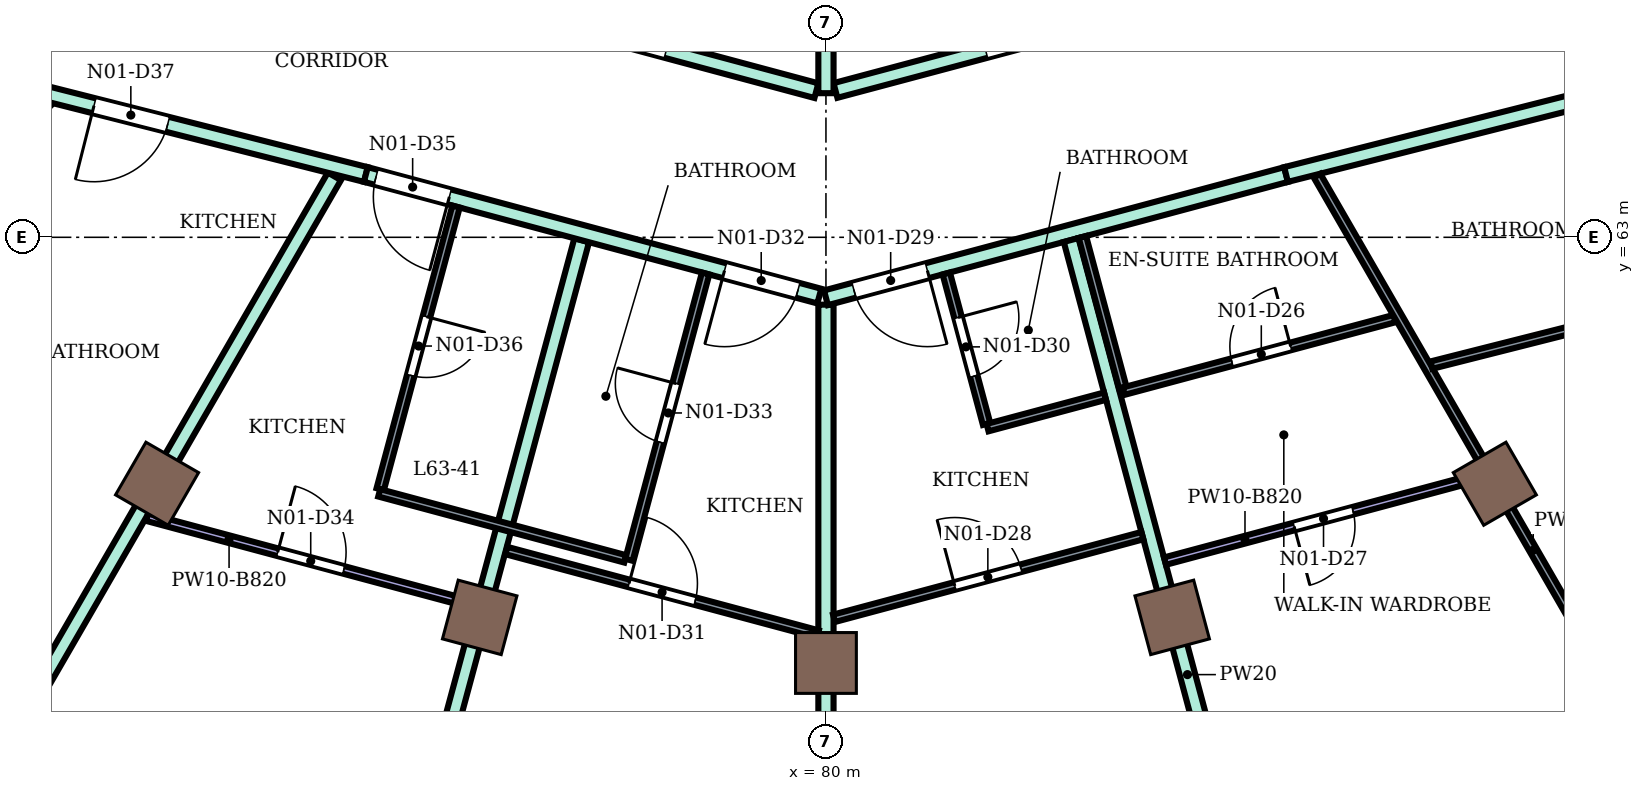
"""IFC4 building model, lengths in metres.
Left out: names, types, materials, properties, quantities, classifications, styles, units other than length and angle.
Written with IfcOpenShell. Run it as: python <this file> out.ifc"""

import sys

from ifc_helpers import new_model, si_unit, direction, frame, frame_2d, origin, origin_2d, place, context, subcontext, project, spatial, rectangle, extrude, element, fill, save


model = new_model("IFC4")
c1 = context("Model", 3, precision=1e-05, world=origin(), true_north=direction((0.0, 1.0)))
c2 = subcontext(c1, "Body", "Model", "MODEL_VIEW")
j1 = project(units=[si_unit("LENGTHUNIT", "METRE"), si_unit("PLANEANGLEUNIT", "RADIAN")], contexts=[c1])
p1 = place(None, origin())
s1 = spatial("IfcSite", under=j1, at=p1, CompositionType="ELEMENT")
p2 = place(p1, origin())
s2 = spatial("IfcBuilding", under=s1, at=p2, CompositionType="ELEMENT")
p3 = place(p2, frame((0.0, 0.0, 275.7)))
s3 = spatial("IfcBuildingStorey", under=s2, at=p3, CompositionType="ELEMENT", Elevation=275.7)
for number, where, z_axis, x_axis in (
    (1, (71.2, 59.758, 0.0), (0.0, 0.0, 1.0), (-0.5, -0.866, 0.0)),
    (2, (75.445, 58.0, 0.0), (0.0, 0.0, 1.0), (-0.259, -0.966, 0.0)),
    (3, (80.0, 57.4, 0.0), (0.0, 0.0, 1.0), (0.0, -1.0, 0.0)),
    (4, (84.555, 58.0, 0.0), (0.0, 0.0, 1.0), (0.259, -0.966, 0.0)),
    (5, (88.8, 59.758, 0.0), (0.0, 0.0, 1.0), (0.5, -0.866, 0.0)),
):
    element("IfcColumn", number, at=place(p3, frame(where, z_axis=z_axis, x_axis=x_axis)), inside=s3, PredefinedType="COLUMN", context=c2, shape_type="SweptSolid", body=[
        extrude(rectangle(XDim=0.8, YDim=0.8, at=origin_2d()), origin(), (0.0, 0.0, 1.0), 4.2),
    ])
p4 = place(p3, frame((67.848, 53.959, 0.0), z_axis=(0.0, 0.0, 1.0), x_axis=(0.500121565392, 0.865955206595, 0.0)))
e6 = element("IfcWall", 6, at=p4, inside=s3, PredefinedType="PARTITIONING", context=c2, shape_type="SweptSolid", body=[
    extrude(rectangle(XDim=11.366, YDim=0.2, at=frame_2d((5.683, 0.0))), origin(), (0.0, 0.0, 1.0), 3.75),
])
p5 = place(p3, frame((68.2, 65.28, 0.0), z_axis=(0.0, 0.0, 1.0), x_axis=(0.969440802773, -0.24532535523, 0.0)))
e7 = element("IfcWall", 7, at=p5, inside=s3, PredefinedType="PARTITIONING", context=c2, shape_type="SweptSolid", body=[
    extrude(rectangle(XDim=5.928, YDim=0.2, at=frame_2d((2.964, 0.0))), origin(), (0.0, 0.0, 1.0), 3.75),
])
p6 = place(p5, frame((2.239, 0.0, 0.0)))
e8 = element("IfcOpeningElement", 8, at=p6, cuts=e7, PredefinedType="OPENING", context=c2, shape_type="SweptSolid", body=[
    extrude(rectangle(XDim=1.0, YDim=2.1, at=frame_2d((0.5, 1.05))), frame((0.0, 0.11, 0.0), z_axis=(0.0, -1.0, 0.0), x_axis=(1.0, 0.0, 0.0)), (0.0, 0.0, 1.0), 0.22),
])
p7 = place(p3, frame((73.702, 51.532, 0.0), z_axis=(0.0, 0.0, 1.0), x_axis=(0.2605791587, 0.965452485652, 0.0)))
e9 = element("IfcWall", 9, at=p7, inside=s3, PredefinedType="PARTITIONING", context=c2, shape_type="SweptSolid", body=[
    extrude(rectangle(XDim=11.838, YDim=0.2, at=frame_2d((5.919, 0.0))), origin(), (0.0, 0.0, 1.0), 3.75),
])
p8 = place(p3, frame((73.947, 63.826, 0.0), z_axis=(0.0, 0.0, 1.0), x_axis=(0.965872508768, -0.25901794688, 0.0)))
e10 = element("IfcWall", 10, at=p8, inside=s3, PredefinedType="PARTITIONING", context=c2, shape_type="SweptSolid", body=[
    extrude(rectangle(XDim=6.177, YDim=0.2, at=frame_2d((3.088, 0.0))), origin(), (0.0, 0.0, 1.0), 3.75),
])
p9 = place(p8, frame((4.885, 0.0, 0.0)))
e11 = element("IfcOpeningElement", 11, at=p9, cuts=e10, PredefinedType="OPENING", context=c2, shape_type="SweptSolid", body=[
    extrude(rectangle(XDim=1.0, YDim=2.1, at=frame_2d((0.5, 1.05))), frame((0.0, 0.11, 0.0), z_axis=(0.0, -1.0, 0.0), x_axis=(1.0, 0.0, 0.0)), (0.0, 0.0, 1.0), 0.22),
])
p10 = place(p8, frame((0.137, 0.0, 0.0)))
e12 = element("IfcOpeningElement", 12, at=p10, cuts=e10, PredefinedType="OPENING", context=c2, shape_type="SweptSolid", body=[
    extrude(rectangle(XDim=1.0, YDim=2.1, at=frame_2d((0.5, 1.05))), frame((0.0, 0.11, 0.0), z_axis=(0.0, -1.0, 0.0), x_axis=(1.0, 0.0, 0.0)), (0.0, 0.0, 1.0), 0.22),
])
p11 = place(p3, frame((74.603, 66.342, 0.0), z_axis=(0.0, 0.0, 1.0), x_axis=(0.965920893652, -0.258837453254, 0.0)))
e13 = element("IfcWall", 13, at=p11, inside=s3, PredefinedType="PARTITIONING", context=c2, shape_type="SweptSolid", body=[
    extrude(rectangle(XDim=5.458, YDim=0.2, at=frame_2d((2.729, 0.0))), origin(), (0.0, 0.0, 1.0), 3.75),
])
p12 = place(p11, frame((2.512, 0.0, 0.0)))
e14 = element("IfcOpeningElement", 14, at=p12, cuts=e13, PredefinedType="OPENING", context=c2, shape_type="SweptSolid", body=[
    extrude(rectangle(XDim=0.9, YDim=2.1, at=frame_2d((0.45, 1.05))), frame((0.0, 0.11, 0.0), z_axis=(0.0, -1.0, 0.0), x_axis=(1.0, 0.0, 0.0)), (0.0, 0.0, 1.0), 0.22),
])
p13 = place(p3, frame((80.125, 64.932, 0.0), z_axis=(0.0, 0.0, 1.0), x_axis=(0.966236955806, 0.257655089674, 0.0)))
e15 = element("IfcWall", 15, at=p13, inside=s3, PredefinedType="PARTITIONING", context=c2, shape_type="SweptSolid", body=[
    extrude(rectangle(XDim=8.039, YDim=0.2, at=frame_2d((4.02, 0.0))), origin(), (0.0, 0.0, 1.0), 3.75),
])
p14 = place(p13, frame((6.298, 0.0, 0.0)))
e16 = element("IfcOpeningElement", 16, at=p14, cuts=e15, PredefinedType="OPENING", context=c2, shape_type="SweptSolid", body=[
    extrude(rectangle(XDim=0.9, YDim=2.1, at=frame_2d((0.45, 1.05))), frame((0.0, 0.11, 0.0), z_axis=(0.0, -1.0, 0.0), x_axis=(1.0, 0.0, 0.0)), (0.0, 0.0, 1.0), 0.22),
])
p15 = place(p13, frame((2.045, 0.0, 0.0)))
e17 = element("IfcOpeningElement", 17, at=p15, cuts=e15, PredefinedType="OPENING", context=c2, shape_type="SweptSolid", body=[
    extrude(rectangle(XDim=0.9, YDim=2.1, at=frame_2d((0.45, 1.05))), frame((0.0, 0.11, 0.0), z_axis=(0.0, -1.0, 0.0), x_axis=(1.0, 0.0, 0.0)), (0.0, 0.0, 1.0), 0.22),
])
p16 = place(p3, frame((80.0, 53.3, 0.0), z_axis=(0.0, 0.0, 1.0), x_axis=(0.0, 1.0, 0.0)))
e18 = element("IfcWall", 18, at=p16, inside=s3, PredefinedType="PARTITIONING", context=c2, shape_type="SweptSolid", body=[
    extrude(rectangle(XDim=8.814, YDim=0.2, at=frame_2d((4.407, 0.0))), origin(), (0.0, 0.0, 1.0), 3.75),
])
p17 = place(p3, frame((80.0, 62.204, 0.0), z_axis=(0.0, 0.0, 1.0), x_axis=(0.965960221635, 0.258690645788, 0.0)))
e19 = element("IfcWall", 19, at=p17, inside=s3, PredefinedType="PARTITIONING", context=c2, shape_type="SweptSolid", body=[
    extrude(rectangle(XDim=6.267, YDim=0.2, at=frame_2d((3.133, 0.0))), origin(), (0.0, 0.0, 1.0), 3.75),
])
p18 = place(p17, frame((0.382, 0.0, 0.0)))
e20 = element("IfcOpeningElement", 20, at=p18, cuts=e19, PredefinedType="OPENING", context=c2, shape_type="SweptSolid", body=[
    extrude(rectangle(XDim=1.0, YDim=2.1, at=frame_2d((0.5, 1.05))), frame((0.0, 0.11, 0.0), z_axis=(0.0, -1.0, 0.0), x_axis=(1.0, 0.0, 0.0)), (0.0, 0.0, 1.0), 0.22),
])
p19 = place(p3, frame((80.0, 64.896, 0.0), z_axis=(0.0, 0.0, 1.0), x_axis=(0.0, 1.0, 0.0)))
e21 = element("IfcWall", 21, at=p19, inside=s3, PredefinedType="PARTITIONING", context=c2, shape_type="SweptSolid", body=[
    extrude(rectangle(XDim=2.405, YDim=0.2, at=frame_2d((1.203, 0.0))), origin(), (0.0, 0.0, 1.0), 3.75),
])
p20 = place(p3, frame((83.225, 62.965, 0.0), z_axis=(0.0, 0.0, 1.0), x_axis=(0.258656021451, -0.965969493601, 0.0)))
e22 = element("IfcWall", 22, at=p20, inside=s3, PredefinedType="PARTITIONING", context=c2, shape_type="SweptSolid", body=[
    extrude(rectangle(XDim=11.838, YDim=0.2, at=frame_2d((5.919, 0.0))), origin(), (0.0, 0.0, 1.0), 3.75),
])
p21 = place(p3, frame((86.053, 63.826, 0.0), z_axis=(0.0, 0.0, 1.0), x_axis=(0.969490004987, 0.245130843083, 0.0)))
e23 = element("IfcWall", 23, at=p21, inside=s3, PredefinedType="PARTITIONING", context=c2, shape_type="SweptSolid", body=[
    extrude(rectangle(XDim=5.908, YDim=0.2, at=frame_2d((2.954, 0.0))), origin(), (0.0, 0.0, 1.0), 3.75),
])
p22 = place(p3, frame((71.068, 59.317, 0.0), z_axis=(0.0, 0.0, 1.0), x_axis=(0.965923173799, -0.258828944127, 0.0)))
e24 = element("IfcWall", 24, at=p22, inside=s3, PredefinedType="PARTITIONING", context=c2, shape_type="SweptSolid", body=[
    extrude(rectangle(XDim=4.468, YDim=0.1, at=frame_2d((2.234, 0.0))), origin(), (0.0, 0.0, 1.0), 3.38),
])
p23 = place(p22, frame((1.779, 0.0, 0.0)))
e25 = element("IfcOpeningElement", 25, at=p23, cuts=e24, PredefinedType="OPENING", context=c2, shape_type="SweptSolid", body=[
    extrude(rectangle(XDim=0.9, YDim=2.1, at=frame_2d((0.45, 1.05))), frame((0.0, 0.06, 0.0), z_axis=(0.0, -1.0, 0.0), x_axis=(1.0, 0.0, 0.0)), (0.0, 0.0, 1.0), 0.12),
])
p24 = place(p3, frame((74.136, 59.686, 0.0), z_axis=(0.0, 0.0, 1.0), x_axis=(0.259020336752, 0.965871867873, 0.0)))
e26 = element("IfcWall", 26, at=p24, inside=s3, PredefinedType="PARTITIONING", context=c2, shape_type="SweptSolid", body=[
    extrude(rectangle(XDim=3.849, YDim=0.1, at=frame_2d((1.925, 0.0))), origin(), (0.0, 0.0, 1.0), 3.75),
])
p25 = place(p24, frame((1.55, 0.0, 0.0)))
e27 = element("IfcOpeningElement", 27, at=p25, cuts=e26, PredefinedType="OPENING", context=c2, shape_type="SweptSolid", body=[
    extrude(rectangle(XDim=0.8, YDim=2.1, at=frame_2d((0.4, 1.05))), frame((0.0, 0.06, 0.0), z_axis=(0.0, -1.0, 0.0), x_axis=(1.0, 0.0, 0.0)), (0.0, 0.0, 1.0), 0.12),
])
p26 = place(p3, frame((74.123, 59.638, 0.0), z_axis=(0.0, 0.0, 1.0), x_axis=(0.965820152698, -0.259213102761, 0.0)))
e28 = element("IfcWall", 28, at=p26, inside=s3, PredefinedType="PARTITIONING", context=c2, shape_type="SweptSolid", body=[
    extrude(rectangle(XDim=3.351, YDim=0.1, at=frame_2d((1.676, 0.0))), origin(), (0.0, 0.0, 1.0), 3.75),
])
p27 = place(p3, frame((75.795, 58.879, 0.0), z_axis=(0.0, 0.0, 1.0), x_axis=(0.965895141847, -0.258933533857, 0.0)))
e29 = element("IfcWall", 29, at=p27, inside=s3, PredefinedType="PARTITIONING", context=c2, shape_type="SweptSolid", body=[
    extrude(rectangle(XDim=4.244, YDim=0.1, at=frame_2d((2.122, 0.0))), origin(), (0.0, 0.0, 1.0), 3.75),
])
p28 = place(p27, frame((1.672, 0.0, 0.0)))
e30 = element("IfcOpeningElement", 30, at=p28, cuts=e29, PredefinedType="OPENING", context=c2, shape_type="SweptSolid", body=[
    extrude(rectangle(XDim=0.9, YDim=2.1, at=frame_2d((0.45, 1.05))), frame((0.0, 0.06, 0.0), z_axis=(0.0, -1.0, 0.0), x_axis=(1.0, 0.0, 0.0)), (0.0, 0.0, 1.0), 0.12),
])
p29 = place(p3, frame((77.408, 58.757, 0.0), z_axis=(0.0, 0.0, 1.0), x_axis=(0.258718354301, 0.965952800683, 0.0)))
e31 = element("IfcWall", 31, at=p29, inside=s3, PredefinedType="PARTITIONING", context=c2, shape_type="SweptSolid", body=[
    extrude(rectangle(XDim=3.9, YDim=0.1, at=frame_2d((1.95, 0.0))), origin(), (0.0, 0.0, 1.0), 3.75),
])
p30 = place(p29, frame((1.6, 0.0, 0.0)))
e32 = element("IfcOpeningElement", 32, at=p30, cuts=e31, PredefinedType="OPENING", context=c2, shape_type="SweptSolid", body=[
    extrude(rectangle(XDim=0.8, YDim=2.1, at=frame_2d((0.4, 1.05))), frame((0.0, 0.06, 0.0), z_axis=(0.0, -1.0, 0.0), x_axis=(1.0, 0.0, 0.0)), (0.0, 0.0, 1.0), 0.12),
])
p31 = place(p3, frame((80.106, 57.988, 0.0), z_axis=(0.0, 0.0, 1.0), x_axis=(0.965893555682, 0.25893945063, 0.0)))
e33 = element("IfcWall", 33, at=p31, inside=s3, PredefinedType="PARTITIONING", context=c2, shape_type="SweptSolid", body=[
    extrude(rectangle(XDim=4.2, YDim=0.1, at=frame_2d((2.1, 0.0))), origin(), (0.0, 0.0, 1.0), 3.75),
])
p32 = place(p31, frame((1.645, 0.0, 0.0)))
e34 = element("IfcOpeningElement", 34, at=p32, cuts=e33, PredefinedType="OPENING", context=c2, shape_type="SweptSolid", body=[
    extrude(rectangle(XDim=0.9, YDim=2.1, at=frame_2d((0.45, 1.05))), frame((0.0, 0.06, 0.0), z_axis=(0.0, -1.0, 0.0), x_axis=(1.0, 0.0, 0.0)), (0.0, 0.0, 1.0), 0.12),
])
p33 = place(p3, frame((81.583, 62.524, 0.0), z_axis=(0.0, 0.0, 1.0), x_axis=(0.258559472989, -0.965995341049, 0.0)))
e35 = element("IfcWall", 35, at=p33, inside=s3, PredefinedType="PARTITIONING", context=c2, shape_type="SweptSolid", body=[
    extrude(rectangle(XDim=2.05, YDim=0.1, at=frame_2d((1.025, 0.0))), origin(), (0.0, 0.0, 1.0), 3.75),
])
p34 = place(p33, frame((0.6, 0.0, 0.0)))
e36 = element("IfcOpeningElement", 36, at=p34, cuts=e35, PredefinedType="OPENING", context=c2, shape_type="SweptSolid", body=[
    extrude(rectangle(XDim=0.8, YDim=2.1, at=frame_2d((0.4, 1.05))), frame((0.0, 0.06, 0.0), z_axis=(0.0, -1.0, 0.0), x_axis=(1.0, 0.0, 0.0)), (0.0, 0.0, 1.0), 0.12),
])
p35 = place(p3, frame((82.126, 60.496, 0.0), z_axis=(0.0, 0.0, 1.0), x_axis=(0.965930342518, 0.258802189717, 0.0)))
e37 = element("IfcWall", 37, at=p35, inside=s3, PredefinedType="PARTITIONING", context=c2, shape_type="SweptSolid", body=[
    extrude(rectangle(XDim=1.6, YDim=0.1, at=frame_2d((0.8, 0.0))), origin(), (0.0, 0.0, 1.0), 3.75),
])
p36 = place(p3, frame((83.374, 63.004, 0.0), z_axis=(0.0, 0.0, 1.0), x_axis=(0.259144823933, -0.965838475227, 0.0)))
e38 = element("IfcWall", 38, at=p36, inside=s3, PredefinedType="PARTITIONING", context=c2, shape_type="SweptSolid", body=[
    extrude(rectangle(XDim=2.05, YDim=0.1, at=frame_2d((1.025, 0.0))), origin(), (0.0, 0.0, 1.0), 3.75),
])
p37 = place(p3, frame((83.918, 60.976, 0.0), z_axis=(0.0, 0.0, 1.0), x_axis=(0.965914351064, 0.258861867428, 0.0)))
e39 = element("IfcWall", 39, at=p37, inside=s3, PredefinedType="PARTITIONING", context=c2, shape_type="SweptSolid", body=[
    extrude(rectangle(XDim=3.687, YDim=0.1, at=frame_2d((1.843, 0.0))), origin(), (0.0, 0.0, 1.0), 3.75),
])
p38 = place(p37, frame((1.473, 0.0, 0.0)))
e40 = element("IfcOpeningElement", 40, at=p38, cuts=e39, PredefinedType="OPENING", context=c2, shape_type="SweptSolid", body=[
    extrude(rectangle(XDim=0.8, YDim=2.1, at=frame_2d((0.4, 1.05))), frame((0.0, 0.06, 0.0), z_axis=(0.0, -1.0, 0.0), x_axis=(1.0, 0.0, 0.0)), (0.0, 0.0, 1.0), 0.12),
])
p39 = place(p3, frame((84.461, 58.74, 0.0), z_axis=(0.0, 0.0, 1.0), x_axis=(0.965893774063, 0.258938636026, 0.0)))
e41 = element("IfcWall", 41, at=p39, inside=s3, PredefinedType="PARTITIONING", context=c2, shape_type="SweptSolid", body=[
    extrude(rectangle(XDim=4.358, YDim=0.1, at=frame_2d((2.179, 0.0))), origin(), (0.0, 0.0, 1.0), 3.38),
])
p40 = place(p39, frame((1.759, 0.0, 0.0)))
e42 = element("IfcOpeningElement", 42, at=p40, cuts=e41, PredefinedType="OPENING", context=c2, shape_type="SweptSolid", body=[
    extrude(rectangle(XDim=0.8, YDim=2.1, at=frame_2d((0.4, 1.05))), frame((0.0, 0.06, 0.0), z_axis=(0.0, -1.0, 0.0), x_axis=(1.0, 0.0, 0.0)), (0.0, 0.0, 1.0), 0.12),
])
p41 = place(p3, frame((86.461, 63.81, 0.0), z_axis=(0.0, 0.0, 1.0), x_axis=(0.499933609462, -0.866063730986, 0.0)))
e43 = element("IfcWall", 43, at=p41, inside=s3, PredefinedType="PARTITIONING", context=c2, shape_type="SweptSolid", body=[
    extrude(rectangle(XDim=11.376, YDim=0.1, at=frame_2d((5.688, 0.0))), origin(), (0.0, 0.0, 1.0), 3.75),
])
p42 = place(p41, frame((7.47, 0.0, 0.0)))
e44 = element("IfcOpeningElement", 44, at=p42, cuts=e43, PredefinedType="OPENING", context=c2, shape_type="SweptSolid", body=[
    extrude(rectangle(XDim=0.9, YDim=2.1, at=frame_2d((0.45, 1.05))), frame((0.0, 0.06, 0.0), z_axis=(0.0, -1.0, 0.0), x_axis=(1.0, 0.0, 0.0)), (0.0, 0.0, 1.0), 0.12),
])
p43 = place(p3, frame((87.966, 61.319, 0.0), z_axis=(0.0, 0.0, 1.0), x_axis=(0.969427184869, 0.245379162189, 0.0)))
e45 = element("IfcWall", 45, at=p43, inside=s3, PredefinedType="PARTITIONING", context=c2, shape_type="SweptSolid", body=[
    extrude(rectangle(XDim=4.625, YDim=0.1, at=frame_2d((2.312, 0.0))), origin(), (0.0, 0.0, 1.0), 3.75),
])
p44 = place(p38, origin())
e46 = element("IfcDoor", 46, at=p44, inside=s3, OperationType="SINGLE_SWING_RIGHT", PredefinedType="DOOR", context=c2, shape_type="SweptSolid", body=[
    extrude(rectangle(XDim=0.8, YDim=2.1, at=frame_2d((0.4, 1.05))), frame((0.0, 0.025, 0.0), z_axis=(0.0, -1.0, 0.0), x_axis=(1.0, 0.0, 0.0)), (0.0, 0.0, 1.0), 0.05),
])
fill(e40, e46)
p45 = place(p40, frame((0.8, 0.0, 0.0), z_axis=(0.0, 0.0, 1.0), x_axis=(-1.0, 0.0, 0.0)))
e47 = element("IfcDoor", 47, at=p45, inside=s3, OperationType="SINGLE_SWING_RIGHT", PredefinedType="DOOR", context=c2, shape_type="SweptSolid", body=[
    extrude(rectangle(XDim=0.8, YDim=2.1, at=frame_2d((0.4, 1.05))), frame((0.0, 0.025, 0.0), z_axis=(0.0, -1.0, 0.0), x_axis=(1.0, 0.0, 0.0)), (0.0, 0.0, 1.0), 0.05),
])
fill(e42, e47)
p46 = place(p32, origin())
e48 = element("IfcDoor", 48, at=p46, inside=s3, OperationType="SINGLE_SWING_LEFT", PredefinedType="DOOR", context=c2, shape_type="SweptSolid", body=[
    extrude(rectangle(XDim=0.9, YDim=2.1, at=frame_2d((0.45, 1.05))), frame((0.0, 0.025, 0.0), z_axis=(0.0, -1.0, 0.0), x_axis=(1.0, 0.0, 0.0)), (0.0, 0.0, 1.0), 0.05),
])
fill(e34, e48)
p47 = place(p18, frame((1.0, 0.0, 0.0), z_axis=(0.0, 0.0, 1.0), x_axis=(-1.0, 0.0, 0.0)))
e49 = element("IfcDoor", 49, at=p47, inside=s3, OperationType="SINGLE_SWING_LEFT", PredefinedType="DOOR", context=c2, shape_type="SweptSolid", body=[
    extrude(rectangle(XDim=1.0, YDim=2.1, at=frame_2d((0.5, 1.05))), frame((0.0, 0.025, 0.0), z_axis=(0.0, -1.0, 0.0), x_axis=(1.0, 0.0, 0.0)), (0.0, 0.0, 1.0), 0.05),
])
fill(e20, e49)
p48 = place(p34, origin())
e50 = element("IfcDoor", 50, at=p48, inside=s3, OperationType="SINGLE_SWING_LEFT", PredefinedType="DOOR", context=c2, shape_type="SweptSolid", body=[
    extrude(rectangle(XDim=0.8, YDim=2.1, at=frame_2d((0.4, 1.05))), frame((0.0, 0.025, 0.0), z_axis=(0.0, -1.0, 0.0), x_axis=(1.0, 0.0, 0.0)), (0.0, 0.0, 1.0), 0.05),
])
fill(e36, e50)
p49 = place(p28, origin())
e51 = element("IfcDoor", 51, at=p49, inside=s3, OperationType="SINGLE_SWING_LEFT", PredefinedType="DOOR", context=c2, shape_type="SweptSolid", body=[
    extrude(rectangle(XDim=0.9, YDim=2.1, at=frame_2d((0.45, 1.05))), frame((0.0, 0.025, 0.0), z_axis=(0.0, -1.0, 0.0), x_axis=(1.0, 0.0, 0.0)), (0.0, 0.0, 1.0), 0.05),
])
fill(e30, e51)
p50 = place(p9, frame((1.0, 0.0, 0.0), z_axis=(0.0, 0.0, 1.0), x_axis=(-1.0, 0.0, 0.0)))
e52 = element("IfcDoor", 52, at=p50, inside=s3, OperationType="SINGLE_SWING_RIGHT", PredefinedType="DOOR", context=c2, shape_type="SweptSolid", body=[
    extrude(rectangle(XDim=1.0, YDim=2.1, at=frame_2d((0.5, 1.05))), frame((0.0, 0.025, 0.0), z_axis=(0.0, -1.0, 0.0), x_axis=(1.0, 0.0, 0.0)), (0.0, 0.0, 1.0), 0.05),
])
fill(e11, e52)
p51 = place(p30, origin())
e53 = element("IfcDoor", 53, at=p51, inside=s3, OperationType="SINGLE_SWING_RIGHT", PredefinedType="DOOR", context=c2, shape_type="SweptSolid", body=[
    extrude(rectangle(XDim=0.8, YDim=2.1, at=frame_2d((0.4, 1.05))), frame((0.0, 0.025, 0.0), z_axis=(0.0, -1.0, 0.0), x_axis=(1.0, 0.0, 0.0)), (0.0, 0.0, 1.0), 0.05),
])
fill(e32, e53)
p52 = place(p23, origin())
e54 = element("IfcDoor", 54, at=p52, inside=s3, OperationType="SINGLE_SWING_LEFT", PredefinedType="DOOR", context=c2, shape_type="SweptSolid", body=[
    extrude(rectangle(XDim=0.9, YDim=2.1, at=frame_2d((0.45, 1.05))), frame((0.0, 0.025, 0.0), z_axis=(0.0, -1.0, 0.0), x_axis=(1.0, 0.0, 0.0)), (0.0, 0.0, 1.0), 0.05),
])
fill(e25, e54)
p53 = place(p10, frame((1.0, 0.0, 0.0), z_axis=(0.0, 0.0, 1.0), x_axis=(-1.0, 0.0, 0.0)))
e55 = element("IfcDoor", 55, at=p53, inside=s3, OperationType="SINGLE_SWING_LEFT", PredefinedType="DOOR", context=c2, shape_type="SweptSolid", body=[
    extrude(rectangle(XDim=1.0, YDim=2.1, at=frame_2d((0.5, 1.05))), frame((0.0, 0.025, 0.0), z_axis=(0.0, -1.0, 0.0), x_axis=(1.0, 0.0, 0.0)), (0.0, 0.0, 1.0), 0.05),
])
fill(e12, e55)
p54 = place(p25, frame((0.8, 0.0, 0.0), z_axis=(0.0, 0.0, 1.0), x_axis=(-1.0, 0.0, 0.0)))
e56 = element("IfcDoor", 56, at=p54, inside=s3, OperationType="SINGLE_SWING_LEFT", PredefinedType="DOOR", context=c2, shape_type="SweptSolid", body=[
    extrude(rectangle(XDim=0.8, YDim=2.1, at=frame_2d((0.4, 1.05))), frame((0.0, 0.025, 0.0), z_axis=(0.0, -1.0, 0.0), x_axis=(1.0, 0.0, 0.0)), (0.0, 0.0, 1.0), 0.05),
])
fill(e27, e56)
p55 = place(p6, frame((1.0, 0.0, 0.0), z_axis=(0.0, 0.0, 1.0), x_axis=(-1.0, 0.0, 0.0)))
e57 = element("IfcDoor", 57, at=p55, inside=s3, OperationType="SINGLE_SWING_RIGHT", PredefinedType="DOOR", context=c2, shape_type="SweptSolid", body=[
    extrude(rectangle(XDim=1.0, YDim=2.1, at=frame_2d((0.5, 1.05))), frame((0.0, 0.025, 0.0), z_axis=(0.0, -1.0, 0.0), x_axis=(1.0, 0.0, 0.0)), (0.0, 0.0, 1.0), 0.05),
])
fill(e8, e57)
save(model, sys.argv[1])
